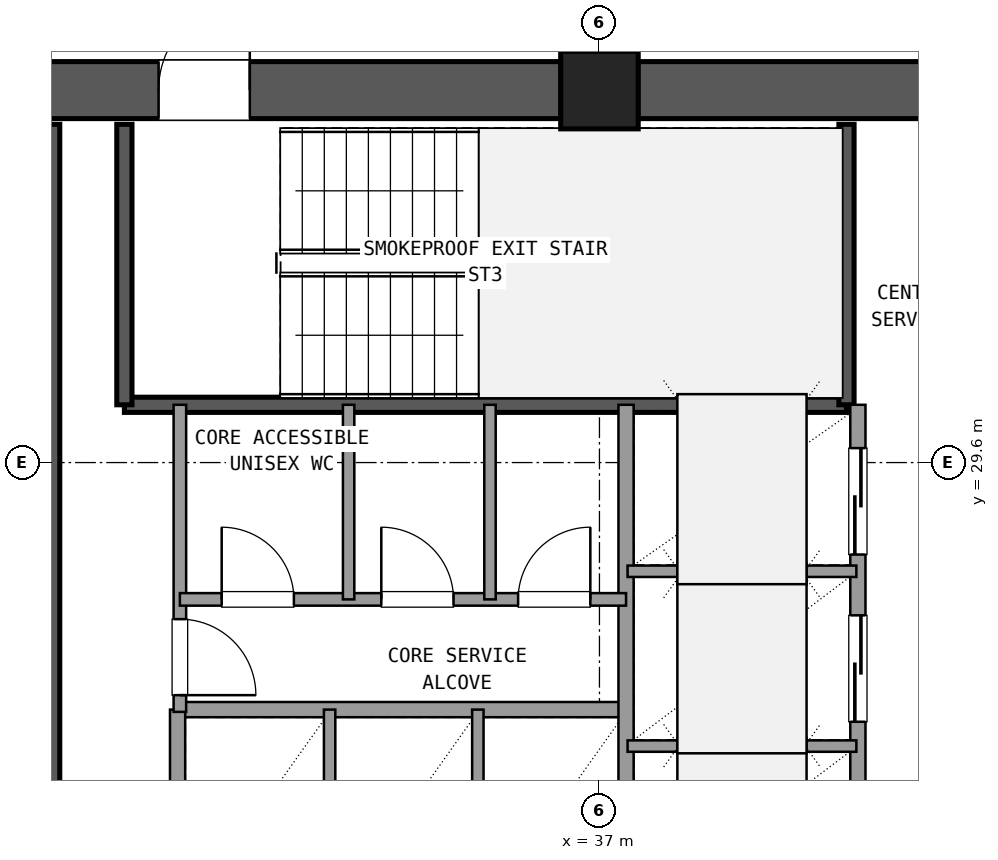
"""IFC4 building model, lengths in metres.
Left out: names, types, materials, properties, quantities, classifications, styles, units other than length and angle.
Written with IfcOpenShell. Run it as: python <this file> out.ifc"""

import sys

from ifc_helpers import new_model, si_unit, direction, frame, frame_2d, origin, origin_2d, place, context, subcontext, project, spatial, rectangle, extrude, element, fill, save


model = new_model("IFC4")
c1 = context("Model", 3, precision=1e-05, world=origin(), true_north=direction((0.0, 1.0)))
c2 = subcontext(c1, "Body", "Model", "MODEL_VIEW")
j1 = project(units=[si_unit("LENGTHUNIT", "METRE"), si_unit("PLANEANGLEUNIT", "RADIAN")], contexts=[c1])
p1 = place(None, origin())
s1 = spatial("IfcSite", under=j1, at=p1, CompositionType="ELEMENT")
p2 = place(p1, origin())
s2 = spatial("IfcBuilding", under=s1, at=p2, CompositionType="ELEMENT")
p3 = place(p2, frame((0.0, 0.0, 113.58)))
s3 = spatial("IfcBuildingStorey", under=s2, at=p3, CompositionType="ELEMENT", Elevation=113.58)
p4 = place(p3, frame((37.0, 34.5, 0.0), z_axis=(0.0, 0.0, 1.0), x_axis=(1.0, 0.0, 0.0)))
e1 = element("IfcColumn", 1, at=p4, inside=s3, PredefinedType="COLUMN", context=c2, shape_type="SweptSolid", body=[
    extrude(rectangle(XDim=1.02, YDim=1.02, at=origin_2d()), origin(), (0.0, 0.0, 1.0), 3.6),
])
p5 = place(p3, frame((47.695, 34.5, 0.0), z_axis=(0.0, 0.0, 1.0), x_axis=(-1.0, 0.0, 0.0)))
e2 = element("IfcWall", 2, at=p5, inside=s3, PredefinedType="SHEAR", context=c2, shape_type="SweptSolid", body=[
    extrude(rectangle(XDim=10.19, YDim=0.75, at=frame_2d((5.095, 0.0))), origin(), (0.0, 0.0, 1.0), 3.32),
])
p6 = place(p5, frame((4.595, 0.0, 0.0)))
e3 = element("IfcOpeningElement", 3, at=p6, cuts=e2, PredefinedType="OPENING", context=c2, shape_type="SweptSolid", body=[
    extrude(rectangle(XDim=1.6, YDim=2.2, at=frame_2d((0.8, 1.1))), frame((0.0, 0.385, 0.0), z_axis=(0.0, -1.0, 0.0), x_axis=(1.0, 0.0, 0.0)), (0.0, 0.0, 1.0), 0.77),
])
p7 = place(p3, frame((36.495, 34.5, 0.0), z_axis=(0.0, 0.0, 1.0), x_axis=(-1.0, 0.0, 0.0)))
e4 = element("IfcWall", 4, at=p7, inside=s3, PredefinedType="SHEAR", context=c2, shape_type="SweptSolid", body=[
    extrude(rectangle(XDim=10.19, YDim=0.75, at=frame_2d((5.095, 0.0))), origin(), (0.0, 0.0, 1.0), 3.32),
])
p8 = place(p7, frame((4.095, 0.0, 0.0)))
e5 = element("IfcOpeningElement", 5, at=p8, cuts=e4, PredefinedType="OPENING", context=c2, shape_type="SweptSolid", body=[
    extrude(rectangle(XDim=1.2, YDim=2.15, at=frame_2d((0.6, 1.075))), frame((0.0, 0.385, 0.0), z_axis=(0.0, -1.0, 0.0), x_axis=(1.0, 0.0, 0.0)), (0.0, 0.0, 1.0), 0.77),
])
p9 = place(p3, frame((29.8, 24.65, 0.0), z_axis=(0.0, 0.0, 1.0), x_axis=(0.0, 1.0, 0.0)))
e6 = element("IfcWall", 6, at=p9, inside=s3, PredefinedType="SHEAR", context=c2, shape_type="SweptSolid", body=[
    extrude(rectangle(XDim=9.4, YDim=0.2, at=frame_2d((4.7, 0.0))), origin(), (0.0, 0.0, 1.0), 3.32),
])
p10 = place(p3, frame((30.75, 30.36, 0.0), z_axis=(0.0, 0.0, 1.0), x_axis=(1.0, 0.0, 0.0)))
e7 = element("IfcWall", 7, at=p10, inside=s3, PredefinedType="SHEAR", context=c2, shape_type="SweptSolid", body=[
    extrude(rectangle(XDim=9.5, YDim=0.2, at=frame_2d((4.75, 0.0))), origin(), (0.0, 0.0, 1.0), 3.32),
])
for number, where, z_axis, x_axis in (
    (8, (30.75, 30.36, 0.0), (0.0, 0.0, 1.0), (0.0, 1.0, 0.0)),
    (9, (40.25, 30.36, 0.0), (0.0, 0.0, 1.0), (0.0, 1.0, 0.0)),
):
    element("IfcWall", number, at=place(p3, frame(where, z_axis=z_axis, x_axis=x_axis)), inside=s3, PredefinedType="SHEAR", context=c2, shape_type="SweptSolid", body=[
        extrude(rectangle(XDim=3.69, YDim=0.2, at=frame_2d((1.845, 0.0))), origin(), (0.0, 0.0, 1.0), 3.32),
    ])
p11 = place(p3, frame((31.45, 26.35, 0.0), z_axis=(0.0, 0.0, 1.0), x_axis=(1.0, 0.0, 0.0)))
e10 = element("IfcWall", 10, at=p11, inside=s3, PredefinedType="SOLIDWALL", context=c2, shape_type="SweptSolid", body=[
    extrude(rectangle(XDim=5.9, YDim=0.2, at=frame_2d((2.95, 0.0))), origin(), (0.0, 0.0, 1.0), 2.61),
])
p12 = place(p3, frame((31.45, 23.54, 0.0), z_axis=(0.0, 0.0, 1.0), x_axis=(0.0, 1.0, 0.0)))
e11 = element("IfcWall", 11, at=p12, inside=s3, PredefinedType="SOLIDWALL", context=c2, shape_type="SweptSolid", body=[
    extrude(rectangle(XDim=2.81, YDim=0.2, at=frame_2d((1.405, 0.0))), origin(), (0.0, 0.0, 1.0), 2.61),
])
for number, where, z_axis, x_axis in (
    (12, (33.45, 23.54, 0.0), (0.0, 0.0, 1.0), (0.0, 1.0, 0.0)),
    (13, (35.4, 23.54, 0.0), (0.0, 0.0, 1.0), (0.0, 1.0, 0.0)),
):
    element("IfcWall", number, at=place(p3, frame(where, z_axis=z_axis, x_axis=x_axis)), inside=s3, PredefinedType="PARTITIONING", context=c2, shape_type="SweptSolid", body=[
        extrude(rectangle(XDim=2.81, YDim=0.15, at=frame_2d((1.405, 0.0))), origin(), (0.0, 0.0, 1.0), 2.61),
    ])
p13 = place(p3, frame((37.35, 23.54, 0.0), z_axis=(0.0, 0.0, 1.0), x_axis=(0.0, 1.0, 0.0)))
e14 = element("IfcWall", 14, at=p13, inside=s3, PredefinedType="SOLIDWALL", context=c2, shape_type="SweptSolid", body=[
    extrude(rectangle(XDim=6.82, YDim=0.2, at=frame_2d((3.41, 0.0))), origin(), (0.0, 0.0, 1.0), 2.61),
])
p14 = place(p3, frame((40.4, 23.54, 0.0), z_axis=(0.0, 0.0, 1.0), x_axis=(0.0, 1.0, 0.0)))
e15 = element("IfcWall", 15, at=p14, inside=s3, PredefinedType="SOLIDWALL", context=c2, shape_type="SweptSolid", body=[
    extrude(rectangle(XDim=6.82, YDim=0.2, at=frame_2d((3.41, 0.0))), origin(), (0.0, 0.0, 1.0), 2.61),
])
p15 = place(p14, frame((0.35, 0.0, 0.0)))
e16 = element("IfcOpeningElement", 16, at=p15, cuts=e15, PredefinedType="OPENING", context=c2, shape_type="SweptSolid", body=[
    extrude(rectangle(XDim=1.4, YDim=2.2, at=frame_2d((0.7, 1.1))), frame((0.0, 0.11, 0.0), z_axis=(0.0, -1.0, 0.0), x_axis=(1.0, 0.0, 0.0)), (0.0, 0.0, 1.0), 0.22),
])
p16 = place(p14, frame((2.65, 0.0, 0.0)))
e17 = element("IfcOpeningElement", 17, at=p16, cuts=e15, PredefinedType="OPENING", context=c2, shape_type="SweptSolid", body=[
    extrude(rectangle(XDim=1.4, YDim=2.2, at=frame_2d((0.7, 1.1))), frame((0.0, 0.11, 0.0), z_axis=(0.0, -1.0, 0.0), x_axis=(1.0, 0.0, 0.0)), (0.0, 0.0, 1.0), 0.22),
])
p17 = place(p14, frame((4.85, 0.0, 0.0)))
e18 = element("IfcOpeningElement", 18, at=p17, cuts=e15, PredefinedType="OPENING", context=c2, shape_type="SweptSolid", body=[
    extrude(rectangle(XDim=1.4, YDim=2.2, at=frame_2d((0.7, 1.1))), frame((0.0, 0.11, 0.0), z_axis=(0.0, -1.0, 0.0), x_axis=(1.0, 0.0, 0.0)), (0.0, 0.0, 1.0), 0.22),
])
for number, where, z_axis, x_axis in (
    (19, (37.37, 25.87, 0.0), (0.0, 0.0, 1.0), (1.0, 0.0, 0.0)),
    (20, (37.37, 28.17, 0.0), (0.0, 0.0, 1.0), (1.0, 0.0, 0.0)),
):
    element("IfcWall", number, at=place(p3, frame(where, z_axis=z_axis, x_axis=x_axis)), inside=s3, PredefinedType="PARTITIONING", context=c2, shape_type="SweptSolid", body=[
        extrude(rectangle(XDim=3.01, YDim=0.15, at=frame_2d((1.505, 0.0))), origin(), (0.0, 0.0, 1.0), 2.61),
    ])
p18 = place(p3, frame((31.48, 26.32, 0.0), z_axis=(0.0, 0.0, 1.0), x_axis=(0.0, 1.0, 0.0)))
e21 = element("IfcWall", 21, at=p18, inside=s3, PredefinedType="PLUMBINGWALL", context=c2, shape_type="SweptSolid", body=[
    extrude(rectangle(XDim=4.04, YDim=0.165, at=frame_2d((2.02, 0.0))), origin(), (0.0, 0.0, 1.0), 2.61),
])
p19 = place(p18, frame((0.22, 0.0, 0.0)))
e22 = element("IfcOpeningElement", 22, at=p19, cuts=e21, PredefinedType="OPENING", context=c2, shape_type="SweptSolid", body=[
    extrude(rectangle(XDim=1.0, YDim=2.15, at=frame_2d((0.5, 1.075))), frame((0.0, 0.093, 0.0), z_axis=(0.0, -1.0, 0.0), x_axis=(1.0, 0.0, 0.0)), (0.0, 0.0, 1.0), 0.185),
])
p20 = place(p3, frame((31.48, 27.8, 0.0), z_axis=(0.0, 0.0, 1.0), x_axis=(1.0, 0.0, 0.0)))
e23 = element("IfcWall", 23, at=p20, inside=s3, PredefinedType="PLUMBINGWALL", context=c2, shape_type="SweptSolid", body=[
    extrude(rectangle(XDim=5.87, YDim=0.165, at=frame_2d((2.935, 0.0))), origin(), (0.0, 0.0, 1.0), 2.61),
])
p21 = place(p20, frame((0.55, 0.0, 0.0)))
e24 = element("IfcOpeningElement", 24, at=p21, cuts=e23, PredefinedType="OPENING", context=c2, shape_type="SweptSolid", body=[
    extrude(rectangle(XDim=0.95, YDim=2.1, at=frame_2d((0.475, 1.05))), frame((0.0, 0.093, 0.0), z_axis=(0.0, -1.0, 0.0), x_axis=(1.0, 0.0, 0.0)), (0.0, 0.0, 1.0), 0.185),
])
p22 = place(p20, frame((2.65, 0.0, 0.0)))
e25 = element("IfcOpeningElement", 25, at=p22, cuts=e23, PredefinedType="OPENING", context=c2, shape_type="SweptSolid", body=[
    extrude(rectangle(XDim=0.95, YDim=2.1, at=frame_2d((0.475, 1.05))), frame((0.0, 0.093, 0.0), z_axis=(0.0, -1.0, 0.0), x_axis=(1.0, 0.0, 0.0)), (0.0, 0.0, 1.0), 0.185),
])
p23 = place(p20, frame((4.45, 0.0, 0.0)))
e26 = element("IfcOpeningElement", 26, at=p23, cuts=e23, PredefinedType="OPENING", context=c2, shape_type="SweptSolid", body=[
    extrude(rectangle(XDim=0.95, YDim=2.1, at=frame_2d((0.475, 1.05))), frame((0.0, 0.093, 0.0), z_axis=(0.0, -1.0, 0.0), x_axis=(1.0, 0.0, 0.0)), (0.0, 0.0, 1.0), 0.185),
])
for number, where, z_axis, x_axis in (
    (27, (33.7, 27.8, 0.0), (0.0, 0.0, 1.0), (0.0, 1.0, 0.0)),
    (28, (35.56, 27.8, 0.0), (0.0, 0.0, 1.0), (0.0, 1.0, 0.0)),
):
    element("IfcWall", number, at=place(p3, frame(where, z_axis=z_axis, x_axis=x_axis)), inside=s3, PredefinedType="PARTITIONING", context=c2, shape_type="SweptSolid", body=[
        extrude(rectangle(XDim=2.56, YDim=0.15, at=frame_2d((1.28, 0.0))), origin(), (0.0, 0.0, 1.0), 2.61),
    ])
p24 = place(p3, frame((37.0, 34.95, 0.0), z_axis=(0.0, 0.0, 1.0), x_axis=(0.0, 1.0, 0.0)))
e29 = element("IfcWall", 29, at=p24, inside=s3, PredefinedType="PARTITIONING", context=c2, shape_type="SweptSolid", body=[
    extrude(rectangle(XDim=3.21, YDim=0.18, at=frame_2d((1.605, 0.0))), origin(), (0.0, 0.0, 1.0), 2.61),
])
p25 = place(p24, frame((0.605, 0.0, 0.0)))
e30 = element("IfcOpeningElement", 30, at=p25, cuts=e29, PredefinedType="OPENING", context=c2, shape_type="SweptSolid", body=[
    extrude(rectangle(XDim=2.0, YDim=2.2, at=frame_2d((1.0, 1.1))), frame((0.0, 0.1, 0.0), z_axis=(0.0, -1.0, 0.0), x_axis=(1.0, 0.0, 0.0)), (0.0, 0.0, 1.0), 0.2),
])
p26 = place(p8, frame((1.2, 0.0, 0.0), z_axis=(0.0, 0.0, 1.0), x_axis=(-1.0, 0.0, 0.0)))
e31 = element("IfcDoor", 31, at=p26, inside=s3, OperationType="SINGLE_SWING_LEFT", PredefinedType="DOOR", context=c2, shape_type="SweptSolid", body=[
    extrude(rectangle(XDim=1.2, YDim=2.15, at=frame_2d((0.6, 1.075))), frame((0.0, 0.025, 0.0), z_axis=(0.0, -1.0, 0.0), x_axis=(1.0, 0.0, 0.0)), (0.0, 0.0, 1.0), 0.05),
])
fill(e5, e31)
p27 = place(p16, origin())
e32 = element("IfcDoor", 32, at=p27, inside=s3, OperationType="SLIDING_TO_LEFT", PredefinedType="DOOR", context=c2, shape_type="SweptSolid", body=[
    extrude(rectangle(XDim=1.4, YDim=2.2, at=frame_2d((0.7, 1.1))), frame((0.0, 0.025, 0.0), z_axis=(0.0, -1.0, 0.0), x_axis=(1.0, 0.0, 0.0)), (0.0, 0.0, 1.0), 0.05),
])
fill(e17, e32)
p28 = place(p17, origin())
e33 = element("IfcDoor", 33, at=p28, inside=s3, OperationType="SLIDING_TO_RIGHT", PredefinedType="DOOR", context=c2, shape_type="SweptSolid", body=[
    extrude(rectangle(XDim=1.4, YDim=2.2, at=frame_2d((0.7, 1.1))), frame((0.0, 0.025, 0.0), z_axis=(0.0, -1.0, 0.0), x_axis=(1.0, 0.0, 0.0)), (0.0, 0.0, 1.0), 0.05),
])
fill(e18, e33)
p29 = place(p19, frame((1.0, 0.0, 0.0), z_axis=(0.0, 0.0, 1.0), x_axis=(-1.0, 0.0, 0.0)))
e34 = element("IfcDoor", 34, at=p29, inside=s3, OperationType="SINGLE_SWING_LEFT", PredefinedType="DOOR", context=c2, shape_type="SweptSolid", body=[
    extrude(rectangle(XDim=1.0, YDim=2.15, at=frame_2d((0.5, 1.075))), frame((0.0, 0.025, 0.0), z_axis=(0.0, -1.0, 0.0), x_axis=(1.0, 0.0, 0.0)), (0.0, 0.0, 1.0), 0.05),
])
fill(e22, e34)
p30 = place(p21, origin())
e35 = element("IfcDoor", 35, at=p30, inside=s3, OperationType="SINGLE_SWING_LEFT", PredefinedType="DOOR", context=c2, shape_type="SweptSolid", body=[
    extrude(rectangle(XDim=0.95, YDim=2.1, at=frame_2d((0.475, 1.05))), frame((0.0, 0.025, 0.0), z_axis=(0.0, -1.0, 0.0), x_axis=(1.0, 0.0, 0.0)), (0.0, 0.0, 1.0), 0.05),
])
fill(e24, e35)
p31 = place(p22, origin())
e36 = element("IfcDoor", 36, at=p31, inside=s3, OperationType="SINGLE_SWING_LEFT", PredefinedType="DOOR", context=c2, shape_type="SweptSolid", body=[
    extrude(rectangle(XDim=0.95, YDim=2.1, at=frame_2d((0.475, 1.05))), frame((0.0, 0.025, 0.0), z_axis=(0.0, -1.0, 0.0), x_axis=(1.0, 0.0, 0.0)), (0.0, 0.0, 1.0), 0.05),
])
fill(e25, e36)
p32 = place(p23, origin())
e37 = element("IfcDoor", 37, at=p32, inside=s3, OperationType="SINGLE_SWING_RIGHT", PredefinedType="DOOR", context=c2, shape_type="SweptSolid", body=[
    extrude(rectangle(XDim=0.95, YDim=2.1, at=frame_2d((0.475, 1.05))), frame((0.0, 0.025, 0.0), z_axis=(0.0, -1.0, 0.0), x_axis=(1.0, 0.0, 0.0)), (0.0, 0.0, 1.0), 0.05),
])
fill(e26, e37)
save(model, sys.argv[1])
